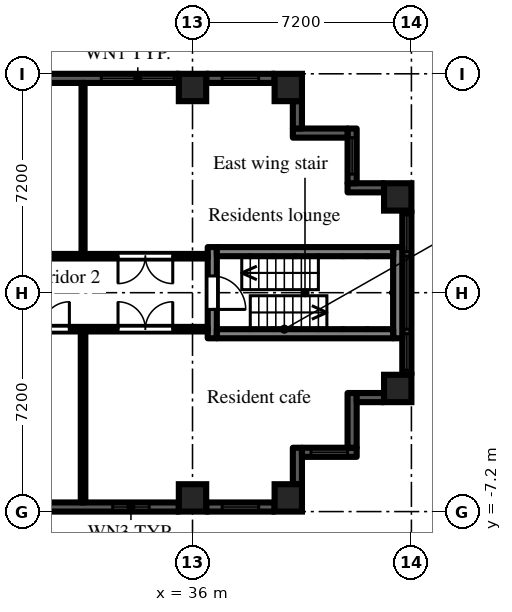
"""IFC4 building model, lengths in metres.
Left out: names, types, materials, properties, quantities, classifications, styles, units other than length and angle.
Written with IfcOpenShell. Run it as: python <this file> out.ifc"""

import sys

from ifc_helpers import new_model, si_unit, direction, frame, frame_2d, origin, origin_2d, place, context, subcontext, project, spatial, rectangle, extrude, element, fill, save


model = new_model("IFC4")
c1 = context("Model", 3, precision=1e-05, world=origin(), true_north=direction((0.0, 1.0)))
c2 = subcontext(c1, "Body", "Model", "MODEL_VIEW")
j1 = project(units=[si_unit("LENGTHUNIT", "METRE"), si_unit("PLANEANGLEUNIT", "RADIAN")], contexts=[c1])
p1 = place(None, origin())
s1 = spatial("IfcSite", under=j1, at=p1, CompositionType="ELEMENT")
p2 = place(p1, origin())
s2 = spatial("IfcBuilding", under=s1, at=p2, CompositionType="ELEMENT")
p3 = place(p2, frame((0.0, 0.0, 20.7)))
s3 = spatial("IfcBuildingStorey", under=s2, at=p3, CompositionType="ELEMENT", Elevation=20.7)
for number, where, z_axis, x_axis in (
    (1, (36.0, -6.75, 0.0), (0.0, 0.0, 1.0), (1.0, 0.0, 0.0)),
    (2, (36.0, 6.75, 0.0), (0.0, 0.0, 1.0), (1.0, 0.0, 0.0)),
    (3, (39.15, -6.75, 0.0), (0.0, 0.0, 1.0), (1.0, 0.0, 0.0)),
    (4, (39.15, 6.75, 0.0), (0.0, 0.0, 1.0), (1.0, 0.0, 0.0)),
    (5, (42.75, -3.15, 0.0), (0.0, 0.0, 1.0), (1.0, 0.0, 0.0)),
    (6, (42.75, 3.15, 0.0), (0.0, 0.0, 1.0), (1.0, 0.0, 0.0)),
):
    element("IfcColumn", number, at=place(p3, frame(where, z_axis=z_axis, x_axis=x_axis)), inside=s3, PredefinedType="COLUMN", context=c2, shape_type="SweptSolid", body=[
        extrude(rectangle(XDim=0.9, YDim=0.9, at=origin_2d()), origin(), (0.0, 0.0, 1.0), 3.0),
    ])
p4 = place(p3, frame((29.25, -7.05, 0.0), z_axis=(0.0, 0.0, 1.0), x_axis=(1.0, 0.0, 0.0)))
e7 = element("IfcWall", 7, at=p4, inside=s3, PredefinedType="SOLIDWALL", context=c2, shape_type="SweptSolid", body=[
    extrude(rectangle(XDim=6.3, YDim=0.3, at=frame_2d((3.15, 0.0))), origin(), (0.0, 0.0, 1.0), 2.1),
])
p5 = place(p4, frame((4.125, 0.0, 0.2)))
e8 = element("IfcOpeningElement", 8, at=p5, cuts=e7, PredefinedType="OPENING", context=c2, shape_type="SweptSolid", body=[
    extrude(rectangle(XDim=1.2, YDim=1.85, at=frame_2d((0.6, 0.925))), frame((0.0, 0.16, 0.0), z_axis=(0.0, -1.0, 0.0), x_axis=(1.0, 0.0, 0.0)), (0.0, 0.0, 1.0), 0.32),
])
p6 = place(p3, frame((36.45, -7.05, 0.0), z_axis=(0.0, 0.0, 1.0), x_axis=(1.0, 0.0, 0.0)))
e9 = element("IfcWall", 9, at=p6, inside=s3, PredefinedType="SOLIDWALL", context=c2, shape_type="SweptSolid", body=[
    extrude(rectangle(XDim=2.25, YDim=0.3, at=frame_2d((1.125, 0.0))), origin(), (0.0, 0.0, 1.0), 2.1),
])
p7 = place(p6, frame((0.525, 0.0, 0.2)))
e10 = element("IfcOpeningElement", 10, at=p7, cuts=e9, PredefinedType="OPENING", context=c2, shape_type="SweptSolid", body=[
    extrude(rectangle(XDim=1.2, YDim=1.85, at=frame_2d((0.6, 0.925))), frame((0.0, 0.16, 0.0), z_axis=(0.0, -1.0, 0.0), x_axis=(1.0, 0.0, 0.0)), (0.0, 0.0, 1.0), 0.32),
])
p8 = place(p3, frame((39.45, -6.3, 0.0), z_axis=(0.0, 0.0, 1.0), x_axis=(0.0, 1.0, 0.0)))
e11 = element("IfcWall", 11, at=p8, inside=s3, PredefinedType="SOLIDWALL", context=c2, shape_type="SweptSolid", body=[
    extrude(rectangle(XDim=1.2, YDim=0.3, at=frame_2d((0.6, 0.0))), origin(), (0.0, 0.0, 1.0), 2.575),
])
p9 = place(p3, frame((39.6, -5.25, 0.0), z_axis=(0.0, 0.0, 1.0), x_axis=(1.0, 0.0, 0.0)))
e12 = element("IfcWall", 12, at=p9, inside=s3, PredefinedType="SOLIDWALL", context=c2, shape_type="SweptSolid", body=[
    extrude(rectangle(XDim=1.8, YDim=0.3, at=frame_2d((0.9, 0.0))), origin(), (0.0, 0.0, 1.0), 2.575),
])
p10 = place(p9, frame((0.3, 0.0, 0.2)))
e13 = element("IfcOpeningElement", 13, at=p10, cuts=e12, PredefinedType="OPENING", context=c2, shape_type="SweptSolid", body=[
    extrude(rectangle(XDim=1.2, YDim=1.85, at=frame_2d((0.6, 0.925))), frame((0.0, 0.16, 0.0), z_axis=(0.0, -1.0, 0.0), x_axis=(1.0, 0.0, 0.0)), (0.0, 0.0, 1.0), 0.32),
])
p11 = place(p3, frame((41.25, -5.1, 0.0), z_axis=(0.0, 0.0, 1.0), x_axis=(0.0, 1.0, 0.0)))
e14 = element("IfcWall", 14, at=p11, inside=s3, PredefinedType="SOLIDWALL", context=c2, shape_type="SweptSolid", body=[
    extrude(rectangle(XDim=1.8, YDim=0.3, at=frame_2d((0.9, 0.0))), origin(), (0.0, 0.0, 1.0), 2.575),
])
p12 = place(p3, frame((41.4, -3.45, 0.0), z_axis=(0.0, 0.0, 1.0), x_axis=(1.0, 0.0, 0.0)))
e15 = element("IfcWall", 15, at=p12, inside=s3, PredefinedType="SOLIDWALL", context=c2, shape_type="SweptSolid", body=[
    extrude(rectangle(XDim=0.9, YDim=0.3, at=frame_2d((0.45, 0.0))), origin(), (0.0, 0.0, 1.0), 2.575),
])
p13 = place(p3, frame((43.05, -2.7, 0.0), z_axis=(0.0, 0.0, 1.0), x_axis=(0.0, 1.0, 0.0)))
e16 = element("IfcWall", 16, at=p13, inside=s3, PredefinedType="SOLIDWALL", context=c2, shape_type="SweptSolid", body=[
    extrude(rectangle(XDim=5.4, YDim=0.3, at=frame_2d((2.7, 0.0))), origin(), (0.0, 0.0, 1.0), 2.1),
])
p14 = place(p13, frame((1.5, 0.0, 0.2)))
e17 = element("IfcOpeningElement", 17, at=p14, cuts=e16, PredefinedType="OPENING", context=c2, shape_type="SweptSolid", body=[
    extrude(rectangle(XDim=2.4, YDim=1.85, at=frame_2d((1.2, 0.925))), frame((0.0, 0.16, 0.0), z_axis=(0.0, -1.0, 0.0), x_axis=(1.0, 0.0, 0.0)), (0.0, 0.0, 1.0), 0.32),
])
p15 = place(p13, frame((0.15, 0.0, 0.2)))
e18 = element("IfcOpeningElement", 18, at=p15, cuts=e16, PredefinedType="OPENING", context=c2, shape_type="SweptSolid", body=[
    extrude(rectangle(XDim=1.2, YDim=1.85, at=frame_2d((0.6, 0.925))), frame((0.0, 0.16, 0.0), z_axis=(0.0, -1.0, 0.0), x_axis=(1.0, 0.0, 0.0)), (0.0, 0.0, 1.0), 0.32),
])
p16 = place(p13, frame((4.05, 0.0, 0.2)))
e19 = element("IfcOpeningElement", 19, at=p16, cuts=e16, PredefinedType="OPENING", context=c2, shape_type="SweptSolid", body=[
    extrude(rectangle(XDim=1.2, YDim=1.85, at=frame_2d((0.6, 0.925))), frame((0.0, 0.16, 0.0), z_axis=(0.0, -1.0, 0.0), x_axis=(1.0, 0.0, 0.0)), (0.0, 0.0, 1.0), 0.32),
])
p17 = place(p3, frame((42.3, 3.45, 0.0), z_axis=(0.0, 0.0, 1.0), x_axis=(-1.0, 0.0, 0.0)))
e20 = element("IfcWall", 20, at=p17, inside=s3, PredefinedType="SOLIDWALL", context=c2, shape_type="SweptSolid", body=[
    extrude(rectangle(XDim=1.2, YDim=0.3, at=frame_2d((0.6, 0.0))), origin(), (0.0, 0.0, 1.0), 2.575),
])
p18 = place(p3, frame((41.25, 3.6, 0.0), z_axis=(0.0, 0.0, 1.0), x_axis=(0.0, 1.0, 0.0)))
e21 = element("IfcWall", 21, at=p18, inside=s3, PredefinedType="SOLIDWALL", context=c2, shape_type="SweptSolid", body=[
    extrude(rectangle(XDim=1.8, YDim=0.3, at=frame_2d((0.9, 0.0))), origin(), (0.0, 0.0, 1.0), 2.575),
])
p19 = place(p18, frame((0.3, 0.0, 0.2)))
e22 = element("IfcOpeningElement", 22, at=p19, cuts=e21, PredefinedType="OPENING", context=c2, shape_type="SweptSolid", body=[
    extrude(rectangle(XDim=1.2, YDim=1.85, at=frame_2d((0.6, 0.925))), frame((0.0, 0.16, 0.0), z_axis=(0.0, -1.0, 0.0), x_axis=(1.0, 0.0, 0.0)), (0.0, 0.0, 1.0), 0.32),
])
p20 = place(p3, frame((41.1, 5.25, 0.0), z_axis=(0.0, 0.0, 1.0), x_axis=(-1.0, 0.0, 0.0)))
e23 = element("IfcWall", 23, at=p20, inside=s3, PredefinedType="SOLIDWALL", context=c2, shape_type="SweptSolid", body=[
    extrude(rectangle(XDim=1.8, YDim=0.3, at=frame_2d((0.9, 0.0))), origin(), (0.0, 0.0, 1.0), 2.575),
])
p21 = place(p3, frame((39.45, 5.4, 0.0), z_axis=(0.0, 0.0, 1.0), x_axis=(0.0, 1.0, 0.0)))
e24 = element("IfcWall", 24, at=p21, inside=s3, PredefinedType="SOLIDWALL", context=c2, shape_type="SweptSolid", body=[
    extrude(rectangle(XDim=0.9, YDim=0.3, at=frame_2d((0.45, 0.0))), origin(), (0.0, 0.0, 1.0), 2.575),
])
p22 = place(p3, frame((38.7, 7.05, 0.0), z_axis=(0.0, 0.0, 1.0), x_axis=(-1.0, 0.0, 0.0)))
e25 = element("IfcWall", 25, at=p22, inside=s3, PredefinedType="SOLIDWALL", context=c2, shape_type="SweptSolid", body=[
    extrude(rectangle(XDim=2.25, YDim=0.3, at=frame_2d((1.125, 0.0))), origin(), (0.0, 0.0, 1.0), 2.1),
])
p23 = place(p22, frame((0.525, 0.0, 0.2)))
e26 = element("IfcOpeningElement", 26, at=p23, cuts=e25, PredefinedType="OPENING", context=c2, shape_type="SweptSolid", body=[
    extrude(rectangle(XDim=1.2, YDim=1.85, at=frame_2d((0.6, 0.925))), frame((0.0, 0.16, 0.0), z_axis=(0.0, -1.0, 0.0), x_axis=(1.0, 0.0, 0.0)), (0.0, 0.0, 1.0), 0.32),
])
p24 = place(p3, frame((35.55, 7.05, 0.0), z_axis=(0.0, 0.0, 1.0), x_axis=(-1.0, 0.0, 0.0)))
e27 = element("IfcWall", 27, at=p24, inside=s3, PredefinedType="SOLIDWALL", context=c2, shape_type="SweptSolid", body=[
    extrude(rectangle(XDim=6.3, YDim=0.3, at=frame_2d((3.15, 0.0))), origin(), (0.0, 0.0, 1.0), 2.1),
])
p25 = place(p24, frame((0.15, 0.0, 0.2)))
e28 = element("IfcOpeningElement", 28, at=p25, cuts=e27, PredefinedType="OPENING", context=c2, shape_type="SweptSolid", body=[
    extrude(rectangle(XDim=2.4, YDim=1.85, at=frame_2d((1.2, 0.925))), frame((0.0, 0.16, 0.0), z_axis=(0.0, -1.0, 0.0), x_axis=(1.0, 0.0, 0.0)), (0.0, 0.0, 1.0), 0.32),
])
p26 = place(p3, frame((36.65, -1.5, 0.0), z_axis=(0.0, 0.0, 1.0), x_axis=(0.0, 1.0, 0.0)))
e29 = element("IfcWall", 29, at=p26, inside=s3, PredefinedType="SHEAR", context=c2, shape_type="SweptSolid", body=[
    extrude(rectangle(XDim=3.0, YDim=0.3, at=frame_2d((1.5, 0.0))), origin(), (0.0, 0.0, 1.0), 2.575),
])
p27 = place(p26, frame((0.95, 0.0, 0.0)))
e30 = element("IfcOpeningElement", 30, at=p27, cuts=e29, PredefinedType="OPENING", context=c2, shape_type="SweptSolid", body=[
    extrude(rectangle(XDim=1.1, YDim=2.1, at=frame_2d((0.55, 1.05))), frame((0.0, 0.16, 0.0), z_axis=(0.0, -1.0, 0.0), x_axis=(1.0, 0.0, 0.0)), (0.0, 0.0, 1.0), 0.32),
])
p28 = place(p3, frame((42.75, -1.5, 0.0), z_axis=(0.0, 0.0, 1.0), x_axis=(0.0, 1.0, 0.0)))
e31 = element("IfcWall", 31, at=p28, inside=s3, PredefinedType="SHEAR", context=c2, shape_type="SweptSolid", body=[
    extrude(rectangle(XDim=3.0, YDim=0.3, at=frame_2d((1.5, 0.0))), origin(), (0.0, 0.0, 1.0), 2.575),
])
for number, where, z_axis, x_axis in (
    (32, (36.8, -1.35, 0.0), (0.0, 0.0, 1.0), (1.0, 0.0, 0.0)),
    (33, (36.8, 1.35, 0.0), (0.0, 0.0, 1.0), (1.0, 0.0, 0.0)),
):
    element("IfcWall", number, at=place(p3, frame(where, z_axis=z_axis, x_axis=x_axis)), inside=s3, PredefinedType="SHEAR", context=c2, shape_type="SweptSolid", body=[
        extrude(rectangle(XDim=5.8, YDim=0.3, at=frame_2d((2.9, 0.0))), origin(), (0.0, 0.0, 1.0), 2.575),
    ])
p29 = place(p3, frame((21.6, -1.2, 0.0), z_axis=(0.0, 0.0, 1.0), x_axis=(1.0, 0.0, 0.0)))
e34 = element("IfcWall", 34, at=p29, inside=s3, PredefinedType="PARTITIONING", context=c2, shape_type="SweptSolid", body=[
    extrude(rectangle(XDim=14.9, YDim=0.15, at=frame_2d((7.45, 0.0))), origin(), (0.0, 0.0, 1.0), 2.575),
])
p30 = place(p29, frame((0.45, 0.0, 0.0)))
e35 = element("IfcOpeningElement", 35, at=p30, cuts=e34, PredefinedType="OPENING", context=c2, shape_type="SweptSolid", body=[
    extrude(rectangle(XDim=0.9, YDim=2.1, at=frame_2d((0.45, 1.05))), frame((0.0, 0.085, 0.0), z_axis=(0.0, -1.0, 0.0), x_axis=(1.0, 0.0, 0.0)), (0.0, 0.0, 1.0), 0.17),
])
p31 = place(p29, frame((2.25, 0.0, 0.0)))
e36 = element("IfcOpeningElement", 36, at=p31, cuts=e34, PredefinedType="OPENING", context=c2, shape_type="SweptSolid", body=[
    extrude(rectangle(XDim=0.9, YDim=2.1, at=frame_2d((0.45, 1.05))), frame((0.0, 0.085, 0.0), z_axis=(0.0, -1.0, 0.0), x_axis=(1.0, 0.0, 0.0)), (0.0, 0.0, 1.0), 0.17),
])
p32 = place(p29, frame((4.05, 0.0, 0.0)))
e37 = element("IfcOpeningElement", 37, at=p32, cuts=e34, PredefinedType="OPENING", context=c2, shape_type="SweptSolid", body=[
    extrude(rectangle(XDim=0.9, YDim=2.1, at=frame_2d((0.45, 1.05))), frame((0.0, 0.085, 0.0), z_axis=(0.0, -1.0, 0.0), x_axis=(1.0, 0.0, 0.0)), (0.0, 0.0, 1.0), 0.17),
])
p33 = place(p29, frame((5.85, 0.0, 0.0)))
e38 = element("IfcOpeningElement", 38, at=p33, cuts=e34, PredefinedType="OPENING", context=c2, shape_type="SweptSolid", body=[
    extrude(rectangle(XDim=0.9, YDim=2.1, at=frame_2d((0.45, 1.05))), frame((0.0, 0.085, 0.0), z_axis=(0.0, -1.0, 0.0), x_axis=(1.0, 0.0, 0.0)), (0.0, 0.0, 1.0), 0.17),
])
p34 = place(p29, frame((7.65, 0.0, 0.0)))
e39 = element("IfcOpeningElement", 39, at=p34, cuts=e34, PredefinedType="OPENING", context=c2, shape_type="SweptSolid", body=[
    extrude(rectangle(XDim=0.9, YDim=2.1, at=frame_2d((0.45, 1.05))), frame((0.0, 0.085, 0.0), z_axis=(0.0, -1.0, 0.0), x_axis=(1.0, 0.0, 0.0)), (0.0, 0.0, 1.0), 0.17),
])
p35 = place(p29, frame((9.45, 0.0, 0.0)))
e40 = element("IfcOpeningElement", 40, at=p35, cuts=e34, PredefinedType="OPENING", context=c2, shape_type="SweptSolid", body=[
    extrude(rectangle(XDim=0.9, YDim=2.1, at=frame_2d((0.45, 1.05))), frame((0.0, 0.085, 0.0), z_axis=(0.0, -1.0, 0.0), x_axis=(1.0, 0.0, 0.0)), (0.0, 0.0, 1.0), 0.17),
])
p36 = place(p29, frame((11.95, 0.0, 0.0)))
e41 = element("IfcOpeningElement", 41, at=p36, cuts=e34, PredefinedType="OPENING", context=c2, shape_type="SweptSolid", body=[
    extrude(rectangle(XDim=1.8, YDim=2.1, at=frame_2d((0.9, 1.05))), frame((0.0, 0.085, 0.0), z_axis=(0.0, -1.0, 0.0), x_axis=(1.0, 0.0, 0.0)), (0.0, 0.0, 1.0), 0.17),
])
p37 = place(p3, frame((21.6, 1.2, 0.0), z_axis=(0.0, 0.0, 1.0), x_axis=(1.0, 0.0, 0.0)))
e42 = element("IfcWall", 42, at=p37, inside=s3, PredefinedType="PARTITIONING", context=c2, shape_type="SweptSolid", body=[
    extrude(rectangle(XDim=14.9, YDim=0.15, at=frame_2d((7.45, 0.0))), origin(), (0.0, 0.0, 1.0), 2.575),
])
p38 = place(p37, frame((1.35, 0.0, 0.0)))
e43 = element("IfcOpeningElement", 43, at=p38, cuts=e42, PredefinedType="OPENING", context=c2, shape_type="SweptSolid", body=[
    extrude(rectangle(XDim=0.9, YDim=2.1, at=frame_2d((0.45, 1.05))), frame((0.0, 0.085, 0.0), z_axis=(0.0, -1.0, 0.0), x_axis=(1.0, 0.0, 0.0)), (0.0, 0.0, 1.0), 0.17),
])
p39 = place(p37, frame((6.3, 0.0, 0.0)))
e44 = element("IfcOpeningElement", 44, at=p39, cuts=e42, PredefinedType="OPENING", context=c2, shape_type="SweptSolid", body=[
    extrude(rectangle(XDim=1.8, YDim=2.1, at=frame_2d((0.9, 1.05))), frame((0.0, 0.085, 0.0), z_axis=(0.0, -1.0, 0.0), x_axis=(1.0, 0.0, 0.0)), (0.0, 0.0, 1.0), 0.17),
])
p40 = place(p37, frame((11.95, 0.0, 0.0)))
e45 = element("IfcOpeningElement", 45, at=p40, cuts=e42, PredefinedType="OPENING", context=c2, shape_type="SweptSolid", body=[
    extrude(rectangle(XDim=1.8, YDim=2.1, at=frame_2d((0.9, 1.05))), frame((0.0, 0.085, 0.0), z_axis=(0.0, -1.0, 0.0), x_axis=(1.0, 0.0, 0.0)), (0.0, 0.0, 1.0), 0.17),
])
p41 = place(p3, frame((32.4, -6.9, 0.0), z_axis=(0.0, 0.0, 1.0), x_axis=(0.0, 1.0, 0.0)))
e46 = element("IfcWall", 46, at=p41, inside=s3, PredefinedType="PARTITIONING", context=c2, shape_type="SweptSolid", body=[
    extrude(rectangle(XDim=5.625, YDim=0.15, at=frame_2d((2.812, 0.0))), origin(), (0.0, 0.0, 1.0), 2.575),
])
p42 = place(p3, frame((32.4, 1.275, 0.0), z_axis=(0.0, 0.0, 1.0), x_axis=(0.0, 1.0, 0.0)))
e47 = element("IfcWall", 47, at=p42, inside=s3, PredefinedType="PARTITIONING", context=c2, shape_type="SweptSolid", body=[
    extrude(rectangle(XDim=5.625, YDim=0.1, at=frame_2d((2.812, 0.0))), origin(), (0.0, 0.0, 1.0), 2.575),
])
p43 = place(p5, origin())
e48 = element("IfcWindow", 48, at=p43, inside=s3, PartitioningType="SINGLE_PANEL", PredefinedType="WINDOW", context=c2, shape_type="SweptSolid", body=[
    extrude(rectangle(XDim=1.2, YDim=1.85, at=frame_2d((0.6, 0.925))), frame((0.0, 0.03, 0.0), z_axis=(0.0, -1.0, 0.0), x_axis=(1.0, 0.0, 0.0)), (0.0, 0.0, 1.0), 0.06),
])
fill(e8, e48)
p44 = place(p7, origin())
e49 = element("IfcWindow", 49, at=p44, inside=s3, PartitioningType="SINGLE_PANEL", PredefinedType="WINDOW", context=c2, shape_type="SweptSolid", body=[
    extrude(rectangle(XDim=1.2, YDim=1.85, at=frame_2d((0.6, 0.925))), frame((0.0, 0.03, 0.0), z_axis=(0.0, -1.0, 0.0), x_axis=(1.0, 0.0, 0.0)), (0.0, 0.0, 1.0), 0.06),
])
fill(e10, e49)
p45 = place(p10, origin())
e50 = element("IfcWindow", 50, at=p45, inside=s3, PartitioningType="SINGLE_PANEL", PredefinedType="WINDOW", context=c2, shape_type="SweptSolid", body=[
    extrude(rectangle(XDim=1.2, YDim=1.85, at=frame_2d((0.6, 0.925))), frame((0.0, 0.03, 0.0), z_axis=(0.0, -1.0, 0.0), x_axis=(1.0, 0.0, 0.0)), (0.0, 0.0, 1.0), 0.06),
])
fill(e13, e50)
p46 = place(p14, origin())
e51 = element("IfcWindow", 51, at=p46, inside=s3, PartitioningType="SINGLE_PANEL", PredefinedType="WINDOW", context=c2, shape_type="SweptSolid", body=[
    extrude(rectangle(XDim=2.4, YDim=1.85, at=frame_2d((1.2, 0.925))), frame((0.0, 0.03, 0.0), z_axis=(0.0, -1.0, 0.0), x_axis=(1.0, 0.0, 0.0)), (0.0, 0.0, 1.0), 0.06),
])
fill(e17, e51)
p47 = place(p15, origin())
e52 = element("IfcWindow", 52, at=p47, inside=s3, PartitioningType="SINGLE_PANEL", PredefinedType="WINDOW", context=c2, shape_type="SweptSolid", body=[
    extrude(rectangle(XDim=1.2, YDim=1.85, at=frame_2d((0.6, 0.925))), frame((0.0, 0.03, 0.0), z_axis=(0.0, -1.0, 0.0), x_axis=(1.0, 0.0, 0.0)), (0.0, 0.0, 1.0), 0.06),
])
fill(e18, e52)
p48 = place(p16, origin())
e53 = element("IfcWindow", 53, at=p48, inside=s3, PartitioningType="SINGLE_PANEL", PredefinedType="WINDOW", context=c2, shape_type="SweptSolid", body=[
    extrude(rectangle(XDim=1.2, YDim=1.85, at=frame_2d((0.6, 0.925))), frame((0.0, 0.03, 0.0), z_axis=(0.0, -1.0, 0.0), x_axis=(1.0, 0.0, 0.0)), (0.0, 0.0, 1.0), 0.06),
])
fill(e19, e53)
p49 = place(p19, origin())
e54 = element("IfcWindow", 54, at=p49, inside=s3, PartitioningType="SINGLE_PANEL", PredefinedType="WINDOW", context=c2, shape_type="SweptSolid", body=[
    extrude(rectangle(XDim=1.2, YDim=1.85, at=frame_2d((0.6, 0.925))), frame((0.0, 0.03, 0.0), z_axis=(0.0, -1.0, 0.0), x_axis=(1.0, 0.0, 0.0)), (0.0, 0.0, 1.0), 0.06),
])
fill(e22, e54)
p50 = place(p23, origin())
e55 = element("IfcWindow", 55, at=p50, inside=s3, PartitioningType="SINGLE_PANEL", PredefinedType="WINDOW", context=c2, shape_type="SweptSolid", body=[
    extrude(rectangle(XDim=1.2, YDim=1.85, at=frame_2d((0.6, 0.925))), frame((0.0, 0.03, 0.0), z_axis=(0.0, -1.0, 0.0), x_axis=(1.0, 0.0, 0.0)), (0.0, 0.0, 1.0), 0.06),
])
fill(e26, e55)
p51 = place(p25, origin())
e56 = element("IfcWindow", 56, at=p51, inside=s3, PartitioningType="SINGLE_PANEL", PredefinedType="WINDOW", context=c2, shape_type="SweptSolid", body=[
    extrude(rectangle(XDim=2.4, YDim=1.85, at=frame_2d((1.2, 0.925))), frame((0.0, 0.03, 0.0), z_axis=(0.0, -1.0, 0.0), x_axis=(1.0, 0.0, 0.0)), (0.0, 0.0, 1.0), 0.06),
])
fill(e28, e56)
p52 = place(p27, frame((1.1, 0.0, 0.0), z_axis=(0.0, 0.0, 1.0), x_axis=(-1.0, 0.0, 0.0)))
e57 = element("IfcDoor", 57, at=p52, inside=s3, OperationType="SINGLE_SWING_RIGHT", PredefinedType="DOOR", context=c2, shape_type="SweptSolid", body=[
    extrude(rectangle(XDim=1.1, YDim=2.1, at=frame_2d((0.55, 1.05))), frame((0.0, 0.025, 0.0), z_axis=(0.0, -1.0, 0.0), x_axis=(1.0, 0.0, 0.0)), (0.0, 0.0, 1.0), 0.05),
])
fill(e30, e57)
p53 = place(p40, frame((1.8, 0.0, 0.0), z_axis=(0.0, 0.0, 1.0), x_axis=(-1.0, 0.0, 0.0)))
e58 = element("IfcDoor", 58, at=p53, inside=s3, OperationType="DOUBLE_DOOR_DOUBLE_SWING", PredefinedType="DOOR", context=c2, shape_type="SweptSolid", body=[
    extrude(rectangle(XDim=1.8, YDim=2.1, at=frame_2d((0.9, 1.05))), frame((0.0, 0.025, 0.0), z_axis=(0.0, -1.0, 0.0), x_axis=(1.0, 0.0, 0.0)), (0.0, 0.0, 1.0), 0.05),
])
fill(e45, e58)
p54 = place(p35, origin())
e59 = element("IfcDoor", 59, at=p54, inside=s3, OperationType="SINGLE_SWING_RIGHT", PredefinedType="DOOR", context=c2, shape_type="SweptSolid", body=[
    extrude(rectangle(XDim=0.9, YDim=2.1, at=frame_2d((0.45, 1.05))), frame((0.0, 0.025, 0.0), z_axis=(0.0, -1.0, 0.0), x_axis=(1.0, 0.0, 0.0)), (0.0, 0.0, 1.0), 0.05),
])
fill(e40, e59)
p55 = place(p36, origin())
e60 = element("IfcDoor", 60, at=p55, inside=s3, OperationType="DOUBLE_DOOR_DOUBLE_SWING", PredefinedType="DOOR", context=c2, shape_type="SweptSolid", body=[
    extrude(rectangle(XDim=1.8, YDim=2.1, at=frame_2d((0.9, 1.05))), frame((0.0, 0.025, 0.0), z_axis=(0.0, -1.0, 0.0), x_axis=(1.0, 0.0, 0.0)), (0.0, 0.0, 1.0), 0.05),
])
fill(e41, e60)
save(model, sys.argv[1])
